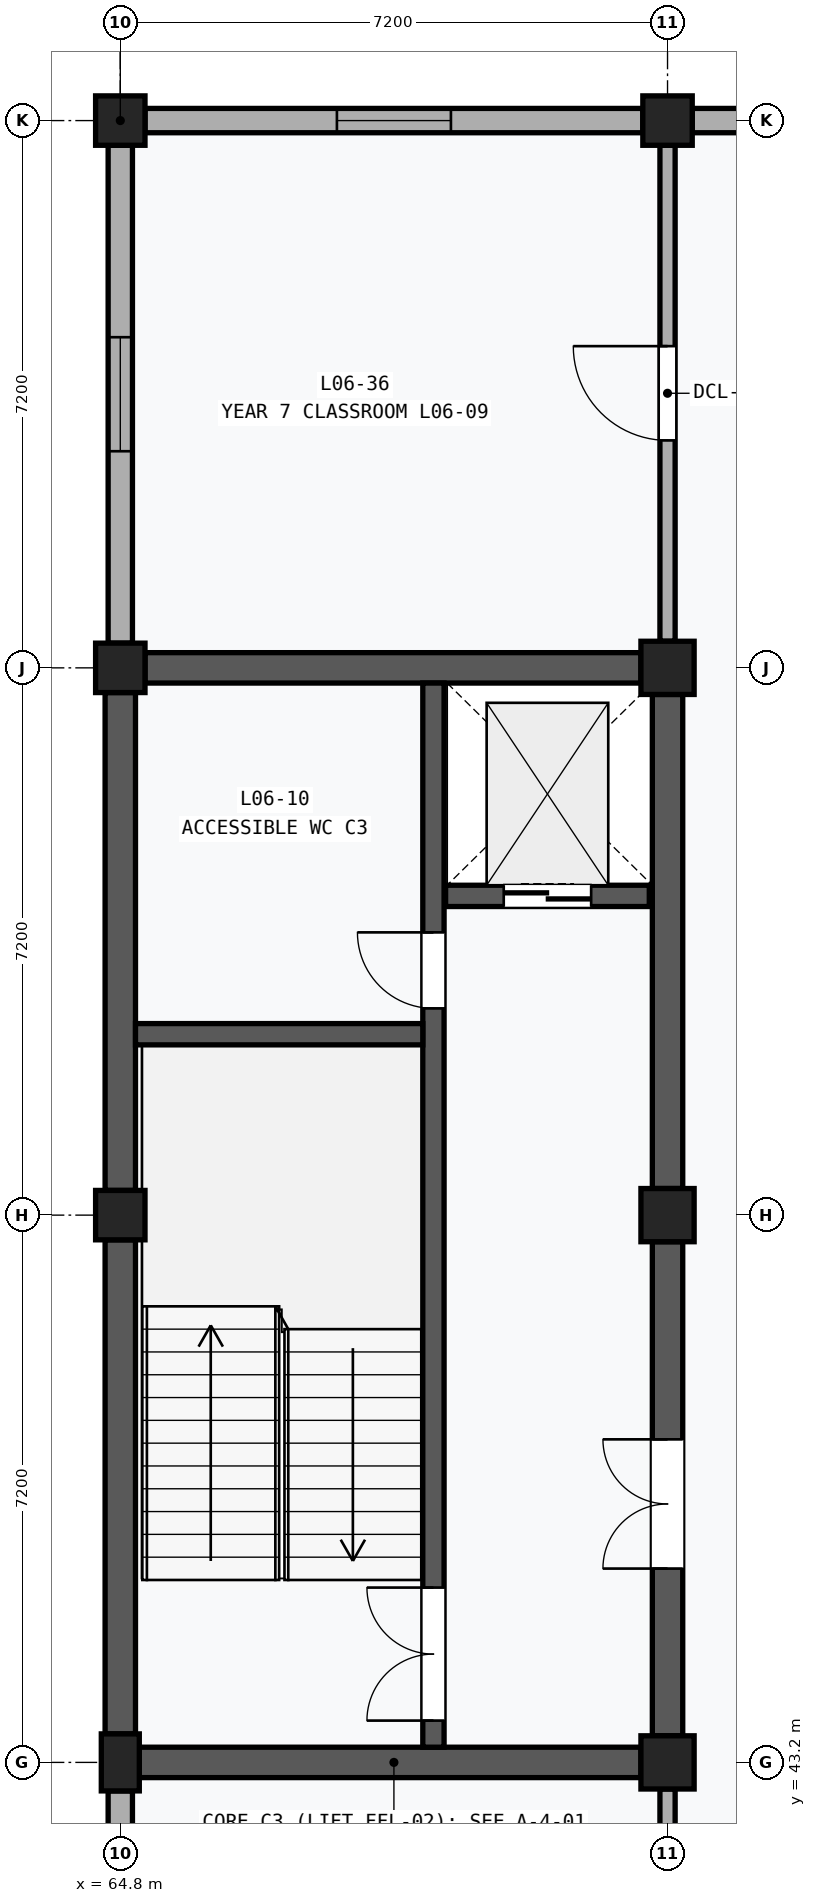
"""IFC4 building model, lengths in metres.
Left out: names, types, materials, properties, quantities, classifications, styles, units other than length and angle.
Written with IfcOpenShell. Run it as: python <this file> out.ifc"""

import sys

from ifc_helpers import new_model, si_unit, direction, frame, frame_2d, origin, origin_2d, place, context, subcontext, project, spatial, rectangle, extrude, element, fill, save


model = new_model("IFC4")
c1 = context("Model", 3, precision=1e-05, world=origin(), true_north=direction((0.0, 1.0)))
c2 = subcontext(c1, "Body", "Model", "MODEL_VIEW")
j1 = project(units=[si_unit("LENGTHUNIT", "METRE"), si_unit("PLANEANGLEUNIT", "RADIAN")], contexts=[c1])
p1 = place(None, origin())
s1 = spatial("IfcSite", under=j1, at=p1, CompositionType="ELEMENT")
p2 = place(p1, origin())
s2 = spatial("IfcBuilding", under=s1, at=p2, CompositionType="ELEMENT")
p3 = place(p2, frame((0.0, 0.0, 26.6)))
s3 = spatial("IfcBuildingStorey", under=s2, at=p3, CompositionType="ELEMENT", Elevation=26.6)
p4 = place(p3, frame((64.8, 43.2, 0.0), z_axis=(0.0, 0.0, 1.0), x_axis=(1.0, 0.0, 0.0)))
e1 = element("IfcColumn", 1, at=p4, inside=s3, PredefinedType="PILASTER", context=c2, shape_type="SweptSolid", body=[
    extrude(rectangle(XDim=0.5, YDim=0.75, at=origin_2d()), origin(), (0.0, 0.0, 1.0), 4.0),
])
for number, where, z_axis, x_axis in (
    (2, (64.8, 50.4, 0.0), (0.0, 0.0, 1.0), (1.0, 0.0, 0.0)),
    (3, (64.8, 57.6, 0.0), (0.0, 0.0, 1.0), (1.0, 0.0, 0.0)),
    (4, (64.8, 64.8, 0.0), (0.0, 0.0, 1.0), (1.0, 0.0, 0.0)),
):
    element("IfcColumn", number, at=place(p3, frame(where, z_axis=z_axis, x_axis=x_axis)), inside=s3, PredefinedType="COLUMN", context=c2, shape_type="SweptSolid", body=[
        extrude(rectangle(XDim=0.65, YDim=0.65, at=origin_2d()), origin(), (0.0, 0.0, 1.0), 4.0),
    ])
for number, where, z_axis, x_axis in (
    (5, (72.0, 43.2, 0.0), (0.0, 0.0, 1.0), (1.0, 0.0, 0.0)),
    (6, (72.0, 50.4, 0.0), (0.0, 0.0, 1.0), (1.0, 0.0, 0.0)),
    (7, (72.0, 57.6, 0.0), (0.0, 0.0, 1.0), (1.0, 0.0, 0.0)),
):
    element("IfcColumn", number, at=place(p3, frame(where, z_axis=z_axis, x_axis=x_axis)), inside=s3, PredefinedType="COLUMN", context=c2, shape_type="SweptSolid", body=[
        extrude(rectangle(XDim=0.7, YDim=0.7, at=origin_2d()), origin(), (0.0, 0.0, 1.0), 4.0),
    ])
p5 = place(p3, frame((72.0, 64.8, 0.0), z_axis=(0.0, 0.0, 1.0), x_axis=(1.0, 0.0, 0.0)))
e8 = element("IfcColumn", 8, at=p5, inside=s3, PredefinedType="COLUMN", context=c2, shape_type="SweptSolid", body=[
    extrude(rectangle(XDim=0.65, YDim=0.65, at=origin_2d()), origin(), (0.0, 0.0, 1.0), 4.0),
])
p6 = place(p3, frame((64.8, 36.325, 0.0), z_axis=(0.0, 0.0, 1.0), x_axis=(0.0, 1.0, 0.0)))
e9 = element("IfcWall", 9, at=p6, inside=s3, PredefinedType="SOLIDWALL", context=c2, shape_type="SweptSolid", body=[
    extrude(rectangle(XDim=6.5, YDim=0.32, at=frame_2d((3.25, 0.0))), origin(), (0.0, 0.0, 1.0), 3.1),
])
p7 = place(p6, frame((2.5, 0.0, 1.1)))
e10 = element("IfcOpeningElement", 10, at=p7, cuts=e9, PredefinedType="OPENING", context=c2, shape_type="SweptSolid", body=[
    extrude(rectangle(XDim=1.5, YDim=1.35, at=frame_2d((0.75, 0.675))), frame((0.0, 0.172, 0.0), z_axis=(0.0, -1.0, 0.0), x_axis=(1.0, 0.0, 0.0)), (0.0, 0.0, 1.0), 0.344),
])
p8 = place(p3, frame((65.125, 64.8, 0.0), z_axis=(0.0, 0.0, 1.0), x_axis=(1.0, 0.0, 0.0)))
e11 = element("IfcWall", 11, at=p8, inside=s3, PredefinedType="SOLIDWALL", context=c2, shape_type="SweptSolid", body=[
    extrude(rectangle(XDim=6.55, YDim=0.32, at=frame_2d((3.275, 0.0))), origin(), (0.0, 0.0, 1.0), 3.1),
])
p9 = place(p8, frame((2.525, 0.0, 1.1)))
e12 = element("IfcOpeningElement", 12, at=p9, cuts=e11, PredefinedType="OPENING", context=c2, shape_type="SweptSolid", body=[
    extrude(rectangle(XDim=1.5, YDim=1.35, at=frame_2d((0.75, 0.675))), frame((0.0, 0.172, 0.0), z_axis=(0.0, -1.0, 0.0), x_axis=(1.0, 0.0, 0.0)), (0.0, 0.0, 1.0), 0.344),
])
p10 = place(p3, frame((64.8, 57.925, 0.0), z_axis=(0.0, 0.0, 1.0), x_axis=(0.0, 1.0, 0.0)))
e13 = element("IfcWall", 13, at=p10, inside=s3, PredefinedType="SOLIDWALL", context=c2, shape_type="SweptSolid", body=[
    extrude(rectangle(XDim=6.55, YDim=0.32, at=frame_2d((3.275, 0.0))), origin(), (0.0, 0.0, 1.0), 3.1),
])
p11 = place(p10, frame((2.525, 0.0, 1.1)))
e14 = element("IfcOpeningElement", 14, at=p11, cuts=e13, PredefinedType="OPENING", context=c2, shape_type="SweptSolid", body=[
    extrude(rectangle(XDim=1.5, YDim=1.35, at=frame_2d((0.75, 0.675))), frame((0.0, 0.172, 0.0), z_axis=(0.0, -1.0, 0.0), x_axis=(1.0, 0.0, 0.0)), (0.0, 0.0, 1.0), 0.344),
])
p12 = place(p3, frame((72.325, 64.8, 0.0), z_axis=(0.0, 0.0, 1.0), x_axis=(1.0, 0.0, 0.0)))
e15 = element("IfcWall", 15, at=p12, inside=s3, PredefinedType="SOLIDWALL", context=c2, shape_type="SweptSolid", body=[
    extrude(rectangle(XDim=6.625, YDim=0.32, at=frame_2d((3.312, 0.0))), origin(), (0.0, 0.0, 1.0), 3.1),
])
p13 = place(p12, frame((2.562, 0.0, 1.1)))
e16 = element("IfcOpeningElement", 16, at=p13, cuts=e15, PredefinedType="OPENING", context=c2, shape_type="SweptSolid", body=[
    extrude(rectangle(XDim=1.5, YDim=1.35, at=frame_2d((0.75, 0.675))), frame((0.0, 0.172, 0.0), z_axis=(0.0, -1.0, 0.0), x_axis=(1.0, 0.0, 0.0)), (0.0, 0.0, 1.0), 0.344),
])
p14 = place(p3, frame((64.8, 43.575, 0.0), z_axis=(0.0, 0.0, 1.0), x_axis=(0.0, 1.0, 0.0)))
e17 = element("IfcWall", 17, at=p14, inside=s3, PredefinedType="SHEAR", context=c2, shape_type="SweptSolid", body=[
    extrude(rectangle(XDim=6.5, YDim=0.4, at=frame_2d((3.25, 0.0))), origin(), (0.0, 0.0, 1.0), 3.1),
])
p15 = place(p3, frame((64.8, 50.725, 0.0), z_axis=(0.0, 0.0, 1.0), x_axis=(0.0, 1.0, 0.0)))
e18 = element("IfcWall", 18, at=p15, inside=s3, PredefinedType="SHEAR", context=c2, shape_type="SweptSolid", body=[
    extrude(rectangle(XDim=6.55, YDim=0.4, at=frame_2d((3.275, 0.0))), origin(), (0.0, 0.0, 1.0), 3.1),
])
p16 = place(p3, frame((72.0, 43.55, 0.0), z_axis=(0.0, 0.0, 1.0), x_axis=(0.0, 1.0, 0.0)))
e19 = element("IfcWall", 19, at=p16, inside=s3, PredefinedType="SHEAR", context=c2, shape_type="SweptSolid", body=[
    extrude(rectangle(XDim=6.5, YDim=0.4, at=frame_2d((3.25, 0.0))), origin(), (0.0, 0.0, 1.0), 2.96),
])
p17 = place(p16, frame((2.2, 0.0, 0.0)))
e20 = element("IfcOpeningElement", 20, at=p17, cuts=e19, PredefinedType="OPENING", context=c2, shape_type="SweptSolid", body=[
    extrude(rectangle(XDim=1.7, YDim=2.25, at=frame_2d((0.85, 1.125))), frame((0.0, 0.212, 0.0), z_axis=(0.0, -1.0, 0.0), x_axis=(1.0, 0.0, 0.0)), (0.0, 0.0, 1.0), 0.424),
])
p18 = place(p3, frame((72.0, 50.75, 0.0), z_axis=(0.0, 0.0, 1.0), x_axis=(0.0, 1.0, 0.0)))
e21 = element("IfcWall", 21, at=p18, inside=s3, PredefinedType="SHEAR", context=c2, shape_type="SweptSolid", body=[
    extrude(rectangle(XDim=6.5, YDim=0.4, at=frame_2d((3.25, 0.0))), origin(), (0.0, 0.0, 1.0), 2.96),
])
p19 = place(p3, frame((65.05, 43.2, 0.0), z_axis=(0.0, 0.0, 1.0), x_axis=(1.0, 0.0, 0.0)))
e22 = element("IfcWall", 22, at=p19, inside=s3, PredefinedType="SHEAR", context=c2, shape_type="SweptSolid", body=[
    extrude(rectangle(XDim=6.6, YDim=0.4, at=frame_2d((3.3, 0.0))), origin(), (0.0, 0.0, 1.0), 2.96),
])
p20 = place(p3, frame((65.125, 57.6, 0.0), z_axis=(0.0, 0.0, 1.0), x_axis=(1.0, 0.0, 0.0)))
e23 = element("IfcWall", 23, at=p20, inside=s3, PredefinedType="SHEAR", context=c2, shape_type="SweptSolid", body=[
    extrude(rectangle(XDim=6.525, YDim=0.4, at=frame_2d((3.262, 0.0))), origin(), (0.0, 0.0, 1.0), 2.96),
])
p21 = place(p3, frame((68.92, 43.4, 0.0), z_axis=(0.0, 0.0, 1.0), x_axis=(0.0, 1.0, 0.0)))
e24 = element("IfcWall", 24, at=p21, inside=s3, PredefinedType="SHEAR", context=c2, shape_type="SweptSolid", body=[
    extrude(rectangle(XDim=14.0, YDim=0.28, at=frame_2d((7.0, 0.0))), origin(), (0.0, 0.0, 1.0), 3.73),
])
p22 = place(p21, frame((0.35, 0.0, 0.0)))
e25 = element("IfcOpeningElement", 25, at=p22, cuts=e24, PredefinedType="OPENING", context=c2, shape_type="SweptSolid", body=[
    extrude(rectangle(XDim=1.75, YDim=2.15, at=frame_2d((0.875, 1.075))), frame((0.0, 0.152, 0.0), z_axis=(0.0, -1.0, 0.0), x_axis=(1.0, 0.0, 0.0)), (0.0, 0.0, 1.0), 0.304),
])
p23 = place(p21, frame((9.72, 0.0, 0.0)))
e26 = element("IfcOpeningElement", 26, at=p23, cuts=e24, PredefinedType="OPENING", context=c2, shape_type="SweptSolid", body=[
    extrude(rectangle(XDim=1.0, YDim=2.15, at=frame_2d((0.5, 1.075))), frame((0.0, 0.152, 0.0), z_axis=(0.0, -1.0, 0.0), x_axis=(1.0, 0.0, 0.0)), (0.0, 0.0, 1.0), 0.304),
])
p24 = place(p3, frame((65.0, 52.78, 0.0), z_axis=(0.0, 0.0, 1.0), x_axis=(1.0, 0.0, 0.0)))
e27 = element("IfcWall", 27, at=p24, inside=s3, PredefinedType="SHEAR", context=c2, shape_type="SweptSolid", body=[
    extrude(rectangle(XDim=3.78, YDim=0.28, at=frame_2d((1.89, 0.0))), origin(), (0.0, 0.0, 1.0), 3.73),
])
p25 = place(p3, frame((69.08, 54.6, 0.0), z_axis=(0.0, 0.0, 1.0), x_axis=(1.0, 0.0, 0.0)))
e28 = element("IfcWall", 28, at=p25, inside=s3, PredefinedType="SHEAR", context=c2, shape_type="SweptSolid", body=[
    extrude(rectangle(XDim=2.68, YDim=0.28, at=frame_2d((1.34, 0.0))), origin(), (0.0, 0.0, 1.0), 3.73),
])
p26 = place(p25, frame((0.765, 0.0, 0.0)))
e29 = element("IfcOpeningElement", 29, at=p26, cuts=e28, PredefinedType="OPENING", context=c2, shape_type="SweptSolid", body=[
    extrude(rectangle(XDim=1.15, YDim=2.2, at=frame_2d((0.575, 1.1))), frame((0.0, 0.152, 0.0), z_axis=(0.0, -1.0, 0.0), x_axis=(1.0, 0.0, 0.0)), (0.0, 0.0, 1.0), 0.304),
])
p27 = place(p3, frame((72.0, 36.35, 0.0), z_axis=(0.0, 0.0, 1.0), x_axis=(0.0, 1.0, 0.0)))
e30 = element("IfcWall", 30, at=p27, inside=s3, PredefinedType="PARTITIONING", context=c2, shape_type="SweptSolid", body=[
    extrude(rectangle(XDim=6.5, YDim=0.2, at=frame_2d((3.25, 0.0))), origin(), (0.0, 0.0, 1.0), 2.96),
])
p28 = place(p3, frame((72.0, 57.95, 0.0), z_axis=(0.0, 0.0, 1.0), x_axis=(0.0, 1.0, 0.0)))
e31 = element("IfcWall", 31, at=p28, inside=s3, PredefinedType="PARTITIONING", context=c2, shape_type="SweptSolid", body=[
    extrude(rectangle(XDim=6.525, YDim=0.2, at=frame_2d((3.263, 0.0))), origin(), (0.0, 0.0, 1.0), 2.96),
])
p29 = place(p28, frame((2.643, 0.0, 0.0)))
e32 = element("IfcOpeningElement", 32, at=p29, cuts=e31, PredefinedType="OPENING", context=c2, shape_type="SweptSolid", body=[
    extrude(rectangle(XDim=1.24, YDim=2.26, at=frame_2d((0.62, 1.13))), frame((0.0, 0.112, 0.0), z_axis=(0.0, -1.0, 0.0), x_axis=(1.0, 0.0, 0.0)), (0.0, 0.0, 1.0), 0.224),
])
p30 = place(p9, origin())
e33 = element("IfcWindow", 33, at=p30, inside=s3, PartitioningType="SINGLE_PANEL", PredefinedType="WINDOW", context=c2, shape_type="SweptSolid", body=[
    extrude(rectangle(XDim=1.5, YDim=1.35, at=frame_2d((0.75, 0.675))), frame((0.0, 0.03, 0.0), z_axis=(0.0, -1.0, 0.0), x_axis=(1.0, 0.0, 0.0)), (0.0, 0.0, 1.0), 0.06),
])
fill(e12, e33)
p31 = place(p11, origin())
e34 = element("IfcWindow", 34, at=p31, inside=s3, PartitioningType="SINGLE_PANEL", PredefinedType="WINDOW", context=c2, shape_type="SweptSolid", body=[
    extrude(rectangle(XDim=1.5, YDim=1.35, at=frame_2d((0.75, 0.675))), frame((0.0, 0.03, 0.0), z_axis=(0.0, -1.0, 0.0), x_axis=(1.0, 0.0, 0.0)), (0.0, 0.0, 1.0), 0.06),
])
fill(e14, e34)
p32 = place(p17, origin())
e35 = element("IfcDoor", 35, at=p32, inside=s3, OperationType="DOUBLE_DOOR_SINGLE_SWING", PredefinedType="DOOR", context=c2, shape_type="SweptSolid", body=[
    extrude(rectangle(XDim=1.7, YDim=2.25, at=frame_2d((0.85, 1.125))), frame((0.0, 0.025, 0.0), z_axis=(0.0, -1.0, 0.0), x_axis=(1.0, 0.0, 0.0)), (0.0, 0.0, 1.0), 0.05),
])
fill(e20, e35)
p33 = place(p22, origin())
e36 = element("IfcDoor", 36, at=p33, inside=s3, OperationType="DOUBLE_DOOR_SINGLE_SWING", PredefinedType="DOOR", context=c2, shape_type="SweptSolid", body=[
    extrude(rectangle(XDim=1.75, YDim=2.15, at=frame_2d((0.875, 1.075))), frame((0.0, 0.025, 0.0), z_axis=(0.0, -1.0, 0.0), x_axis=(1.0, 0.0, 0.0)), (0.0, 0.0, 1.0), 0.05),
])
fill(e25, e36)
p34 = place(p23, origin())
e37 = element("IfcDoor", 37, at=p34, inside=s3, OperationType="SINGLE_SWING_RIGHT", PredefinedType="DOOR", context=c2, shape_type="SweptSolid", body=[
    extrude(rectangle(XDim=1.0, YDim=2.15, at=frame_2d((0.5, 1.075))), frame((0.0, 0.025, 0.0), z_axis=(0.0, -1.0, 0.0), x_axis=(1.0, 0.0, 0.0)), (0.0, 0.0, 1.0), 0.05),
])
fill(e26, e37)
p35 = place(p26, frame((1.15, 0.0, 0.0), z_axis=(0.0, 0.0, 1.0), x_axis=(-1.0, 0.0, 0.0)))
e38 = element("IfcDoor", 38, at=p35, inside=s3, OperationType="DOUBLE_DOOR_SLIDING", PredefinedType="DOOR", context=c2, shape_type="SweptSolid", body=[
    extrude(rectangle(XDim=1.15, YDim=2.2, at=frame_2d((0.575, 1.1))), frame((0.0, 0.025, 0.0), z_axis=(0.0, -1.0, 0.0), x_axis=(1.0, 0.0, 0.0)), (0.0, 0.0, 1.0), 0.05),
])
fill(e29, e38)
p36 = place(p29, origin())
e39 = element("IfcDoor", 39, at=p36, inside=s3, OperationType="SINGLE_SWING_RIGHT", PredefinedType="DOOR", context=c2, shape_type="SweptSolid", body=[
    extrude(rectangle(XDim=1.24, YDim=2.26, at=frame_2d((0.62, 1.13))), frame((0.0, 0.025, 0.0), z_axis=(0.0, -1.0, 0.0), x_axis=(1.0, 0.0, 0.0)), (0.0, 0.0, 1.0), 0.05),
])
fill(e32, e39)
save(model, sys.argv[1])
